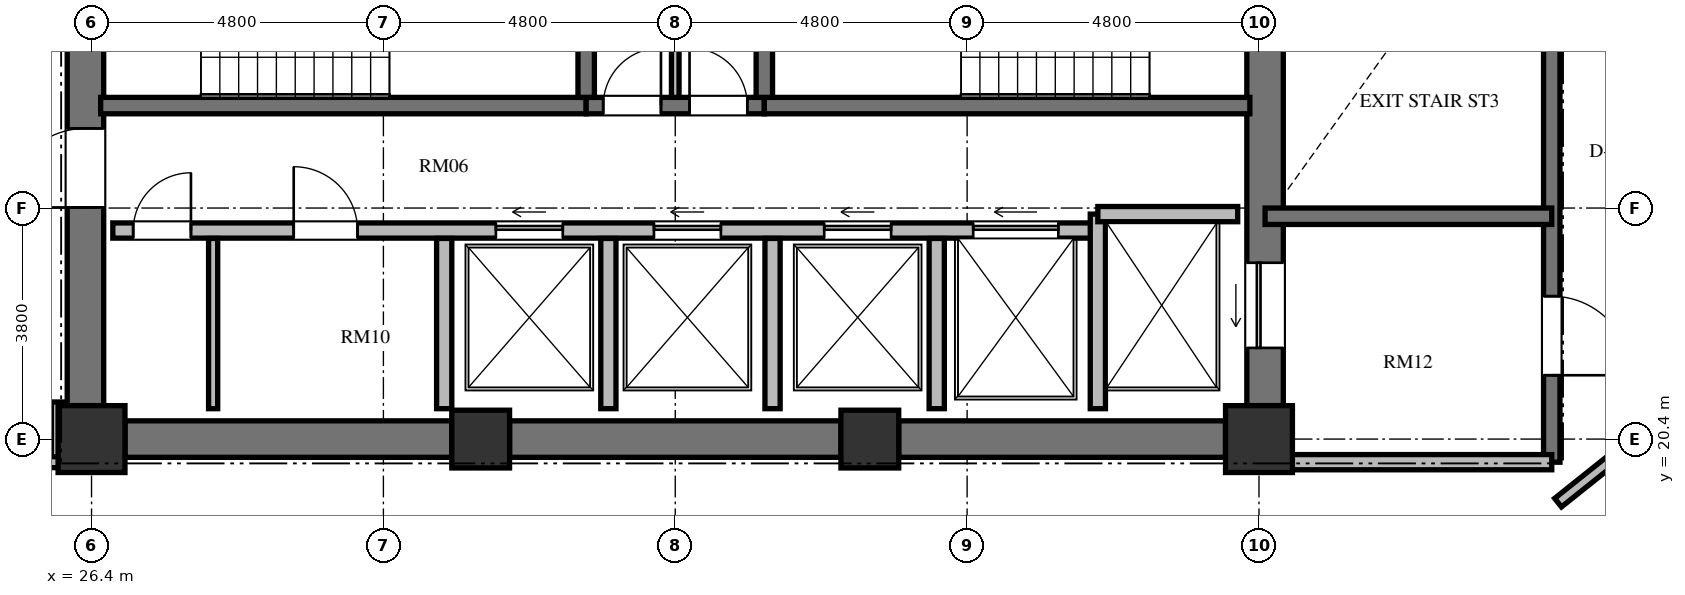
"""IFC4 building model, lengths in metres.
Left out: names, types, materials, properties, quantities, classifications, styles, units other than length and angle.
Written with IfcOpenShell. Run it as: python <this file> out.ifc"""

import sys

from ifc_helpers import new_model, si_unit, direction, frame, frame_2d, origin, origin_2d, place, context, subcontext, project, spatial, rectangle, extrude, element, fill, save


model = new_model("IFC4")
c1 = context("Model", 3, precision=1e-05, world=origin(), true_north=direction((0.0, 1.0)))
c2 = subcontext(c1, "Body", "Model", "MODEL_VIEW")
j1 = project(units=[si_unit("LENGTHUNIT", "METRE"), si_unit("PLANEANGLEUNIT", "RADIAN")], contexts=[c1])
p1 = place(None, origin())
s1 = spatial("IfcSite", under=j1, at=p1, CompositionType="ELEMENT")
p2 = place(p1, origin())
s2 = spatial("IfcBuilding", under=s1, at=p2, CompositionType="ELEMENT")
p3 = place(p2, frame((0.0, 0.0, 163.824)))
s3 = spatial("IfcBuildingStorey", under=s2, at=p3, CompositionType="ELEMENT", Elevation=163.824)
p4 = place(p3, frame((26.4, 20.4, 0.0), z_axis=(0.0, 0.0, 1.0), x_axis=(1.0, 0.0, 0.0)))
e1 = element("IfcColumn", 1, at=p4, inside=s3, PredefinedType="COLUMN", context=c2, shape_type="SweptSolid", body=[
    extrude(rectangle(XDim=1.1, YDim=1.1, at=origin_2d()), origin(), (0.0, 0.0, 1.0), 3.648),
])
for number, where, z_axis, x_axis in (
    (2, (32.8, 20.4, 0.0), (0.0, 0.0, 1.0), (1.0, 0.0, 0.0)),
    (3, (39.2, 20.4, 0.0), (0.0, 0.0, 1.0), (1.0, 0.0, 0.0)),
):
    element("IfcColumn", number, at=place(p3, frame(where, z_axis=z_axis, x_axis=x_axis)), inside=s3, PredefinedType="COLUMN", context=c2, shape_type="SweptSolid", body=[
        extrude(rectangle(XDim=0.95, YDim=0.95, at=origin_2d()), origin(), (0.0, 0.0, 1.0), 3.648),
    ])
p5 = place(p3, frame((45.6, 20.4, 0.0), z_axis=(0.0, 0.0, 1.0), x_axis=(1.0, 0.0, 0.0)))
e4 = element("IfcColumn", 4, at=p5, inside=s3, PredefinedType="COLUMN", context=c2, shape_type="SweptSolid", body=[
    extrude(rectangle(XDim=1.1, YDim=1.1, at=origin_2d()), origin(), (0.0, 0.0, 1.0), 3.648),
])
p6 = place(p3, frame((26.3, 20.95, 0.0), z_axis=(0.0, 0.0, 1.0), x_axis=(0.0, 1.0, 0.0)))
e5 = element("IfcWall", 5, at=p6, inside=s3, PredefinedType="SHEAR", context=c2, shape_type="SweptSolid", body=[
    extrude(rectangle(XDim=14.1, YDim=0.6, at=frame_2d((7.05, 0.0))), origin(), (0.0, 0.0, 1.0), 3.648),
])
p7 = place(p6, frame((6.5, 0.0, 0.0)))
e6 = element("IfcOpeningElement", 6, at=p7, cuts=e5, PredefinedType="OPENING", context=c2, shape_type="SweptSolid", body=[
    extrude(rectangle(XDim=1.2, YDim=2.15, at=frame_2d((0.6, 1.075))), frame((0.0, 0.31, 0.0), z_axis=(0.0, -1.0, 0.0), x_axis=(1.0, 0.0, 0.0)), (0.0, 0.0, 1.0), 0.62),
])
p8 = place(p6, frame((9.6, 0.0, 0.0)))
e7 = element("IfcOpeningElement", 7, at=p8, cuts=e5, PredefinedType="OPENING", context=c2, shape_type="SweptSolid", body=[
    extrude(rectangle(XDim=1.3, YDim=2.2, at=frame_2d((0.65, 1.1))), frame((0.0, 0.31, 0.0), z_axis=(0.0, -1.0, 0.0), x_axis=(1.0, 0.0, 0.0)), (0.0, 0.0, 1.0), 0.62),
])
p9 = place(p6, frame((3.26, 0.0, 0.0)))
e8 = element("IfcOpeningElement", 8, at=p9, cuts=e5, PredefinedType="OPENING", context=c2, shape_type="SweptSolid", body=[
    extrude(rectangle(XDim=1.3, YDim=2.2, at=frame_2d((0.65, 1.1))), frame((0.0, 0.31, 0.0), z_axis=(0.0, -1.0, 0.0), x_axis=(1.0, 0.0, 0.0)), (0.0, 0.0, 1.0), 0.62),
])
p10 = place(p3, frame((45.7, 20.95, 0.0), z_axis=(0.0, 0.0, 1.0), x_axis=(0.0, 1.0, 0.0)))
e9 = element("IfcWall", 9, at=p10, inside=s3, PredefinedType="SHEAR", context=c2, shape_type="SweptSolid", body=[
    extrude(rectangle(XDim=14.1, YDim=0.6, at=frame_2d((7.05, 0.0))), origin(), (0.0, 0.0, 1.0), 3.648),
])
p11 = place(p10, frame((11.75, 0.0, 0.0)))
e10 = element("IfcOpeningElement", 10, at=p11, cuts=e9, PredefinedType="OPENING", context=c2, shape_type="SweptSolid", body=[
    extrude(rectangle(XDim=1.4, YDim=2.3, at=frame_2d((0.7, 1.15))), frame((0.0, 0.31, 0.0), z_axis=(0.0, -1.0, 0.0), x_axis=(1.0, 0.0, 0.0)), (0.0, 0.0, 1.0), 0.62),
])
p12 = place(p10, frame((0.95, 0.0, 0.0)))
e11 = element("IfcOpeningElement", 11, at=p12, cuts=e9, PredefinedType="OPENING", context=c2, shape_type="SweptSolid", body=[
    extrude(rectangle(XDim=1.4, YDim=2.3, at=frame_2d((0.7, 1.15))), frame((0.0, 0.31, 0.0), z_axis=(0.0, -1.0, 0.0), x_axis=(1.0, 0.0, 0.0)), (0.0, 0.0, 1.0), 0.62),
])
p13 = place(p3, frame((26.95, 20.4, 0.0), z_axis=(0.0, 0.0, 1.0), x_axis=(1.0, 0.0, 0.0)))
e12 = element("IfcWall", 12, at=p13, inside=s3, PredefinedType="SHEAR", context=c2, shape_type="SweptSolid", body=[
    extrude(rectangle(XDim=5.375, YDim=0.6, at=frame_2d((2.688, 0.0))), origin(), (0.0, 0.0, 1.0), 3.648),
])
p14 = place(p3, frame((33.275, 20.4, 0.0), z_axis=(0.0, 0.0, 1.0), x_axis=(1.0, 0.0, 0.0)))
e13 = element("IfcWall", 13, at=p14, inside=s3, PredefinedType="SHEAR", context=c2, shape_type="SweptSolid", body=[
    extrude(rectangle(XDim=5.45, YDim=0.6, at=frame_2d((2.725, 0.0))), origin(), (0.0, 0.0, 1.0), 3.648),
])
p15 = place(p3, frame((39.675, 20.4, 0.0), z_axis=(0.0, 0.0, 1.0), x_axis=(1.0, 0.0, 0.0)))
e14 = element("IfcWall", 14, at=p15, inside=s3, PredefinedType="SHEAR", context=c2, shape_type="SweptSolid", body=[
    extrude(rectangle(XDim=5.375, YDim=0.6, at=frame_2d((2.688, 0.0))), origin(), (0.0, 0.0, 1.0), 3.648),
])
p16 = place(p3, frame((26.55, 25.885, 0.0), z_axis=(0.0, 0.0, 1.0), x_axis=(1.0, 0.0, 0.0)))
e15 = element("IfcWall", 15, at=p16, inside=s3, PredefinedType="SHEAR", context=c2, shape_type="SweptSolid", body=[
    extrude(rectangle(XDim=7.985, YDim=0.27, at=frame_2d((3.992, 0.0))), origin(), (0.0, 0.0, 1.0), 3.648),
])
p17 = place(p3, frame((34.535, 25.885, 0.0), z_axis=(0.0, 0.0, 1.0), x_axis=(1.0, 0.0, 0.0)))
e16 = element("IfcWall", 16, at=p17, inside=s3, PredefinedType="SHEAR", context=c2, shape_type="SweptSolid", body=[
    extrude(rectangle(XDim=2.93, YDim=0.27, at=frame_2d((1.465, 0.0))), origin(), (0.0, 0.0, 1.0), 3.648),
])
p18 = place(p17, frame((0.28, 0.0, 0.0)))
e17 = element("IfcOpeningElement", 17, at=p18, cuts=e16, PredefinedType="OPENING", context=c2, shape_type="SweptSolid", body=[
    extrude(rectangle(XDim=0.95, YDim=2.1, at=frame_2d((0.475, 1.05))), frame((0.0, 0.145, 0.0), z_axis=(0.0, -1.0, 0.0), x_axis=(1.0, 0.0, 0.0)), (0.0, 0.0, 1.0), 0.29),
])
p19 = place(p17, frame((1.7, 0.0, 0.0)))
e18 = element("IfcOpeningElement", 18, at=p19, cuts=e16, PredefinedType="OPENING", context=c2, shape_type="SweptSolid", body=[
    extrude(rectangle(XDim=0.95, YDim=2.1, at=frame_2d((0.475, 1.05))), frame((0.0, 0.145, 0.0), z_axis=(0.0, -1.0, 0.0), x_axis=(1.0, 0.0, 0.0)), (0.0, 0.0, 1.0), 0.29),
])
p20 = place(p3, frame((37.465, 25.885, 0.0), z_axis=(0.0, 0.0, 1.0), x_axis=(1.0, 0.0, 0.0)))
e19 = element("IfcWall", 19, at=p20, inside=s3, PredefinedType="SHEAR", context=c2, shape_type="SweptSolid", body=[
    extrude(rectangle(XDim=7.985, YDim=0.27, at=frame_2d((3.992, 0.0))), origin(), (0.0, 0.0, 1.0), 3.648),
])
for number, where, z_axis, x_axis in (
    (20, (34.535, 26.02, 0.0), (0.0, 0.0, 1.0), (0.0, 1.0, 0.0)),
    (21, (37.465, 26.02, 0.0), (0.0, 0.0, 1.0), (0.0, 1.0, 0.0)),
):
    element("IfcWall", number, at=place(p3, frame(where, z_axis=z_axis, x_axis=x_axis)), inside=s3, PredefinedType="SHEAR", context=c2, shape_type="SweptSolid", body=[
        extrude(rectangle(XDim=4.08, YDim=0.27, at=frame_2d((2.04, 0.0))), origin(), (0.0, 0.0, 1.0), 3.648),
    ])
p21 = place(p3, frame((36.0, 26.02, 0.0), z_axis=(0.0, 0.0, 1.0), x_axis=(0.0, 1.0, 0.0)))
e22 = element("IfcWall", 22, at=p21, inside=s3, PredefinedType="PARTITIONING", context=c2, shape_type="SweptSolid", body=[
    extrude(rectangle(XDim=4.08, YDim=0.125, at=frame_2d((2.04, 0.0))), origin(), (0.0, 0.0, 1.0), 3.428),
])
p22 = place(p3, frame((26.75, 23.83, 0.0), z_axis=(0.0, 0.0, 1.0), x_axis=(1.0, 0.0, 0.0)))
e23 = element("IfcWall", 23, at=p22, inside=s3, PredefinedType="SOLIDWALL", context=c2, shape_type="SweptSolid", body=[
    extrude(rectangle(XDim=16.2, YDim=0.25, at=frame_2d((8.1, 0.0))), origin(), (0.0, 0.0, 1.0), 3.428),
])
p23 = place(p22, frame((0.335, 0.0, 0.0)))
e24 = element("IfcOpeningElement", 24, at=p23, cuts=e23, PredefinedType="OPENING", context=c2, shape_type="SweptSolid", body=[
    extrude(rectangle(XDim=0.95, YDim=2.1, at=frame_2d((0.475, 1.05))), frame((0.0, 0.135, 0.0), z_axis=(0.0, -1.0, 0.0), x_axis=(1.0, 0.0, 0.0)), (0.0, 0.0, 1.0), 0.27),
])
p24 = place(p22, frame((2.975, 0.0, 0.0)))
e25 = element("IfcOpeningElement", 25, at=p24, cuts=e23, PredefinedType="OPENING", context=c2, shape_type="SweptSolid", body=[
    extrude(rectangle(XDim=1.05, YDim=2.15, at=frame_2d((0.525, 1.075))), frame((0.0, 0.135, 0.0), z_axis=(0.0, -1.0, 0.0), x_axis=(1.0, 0.0, 0.0)), (0.0, 0.0, 1.0), 0.27),
])
p25 = place(p22, frame((6.3, 0.0, 0.0)))
e26 = element("IfcOpeningElement", 26, at=p25, cuts=e23, PredefinedType="OPENING", context=c2, shape_type="SweptSolid", body=[
    extrude(rectangle(XDim=1.1, YDim=2.2, at=frame_2d((0.55, 1.1))), frame((0.0, 0.135, 0.0), z_axis=(0.0, -1.0, 0.0), x_axis=(1.0, 0.0, 0.0)), (0.0, 0.0, 1.0), 0.27),
])
p26 = place(p22, frame((8.9, 0.0, 0.0)))
e27 = element("IfcOpeningElement", 27, at=p26, cuts=e23, PredefinedType="OPENING", context=c2, shape_type="SweptSolid", body=[
    extrude(rectangle(XDim=1.1, YDim=2.2, at=frame_2d((0.55, 1.1))), frame((0.0, 0.135, 0.0), z_axis=(0.0, -1.0, 0.0), x_axis=(1.0, 0.0, 0.0)), (0.0, 0.0, 1.0), 0.27),
])
p27 = place(p22, frame((11.7, 0.0, 0.0)))
e28 = element("IfcOpeningElement", 28, at=p27, cuts=e23, PredefinedType="OPENING", context=c2, shape_type="SweptSolid", body=[
    extrude(rectangle(XDim=1.1, YDim=2.2, at=frame_2d((0.55, 1.1))), frame((0.0, 0.135, 0.0), z_axis=(0.0, -1.0, 0.0), x_axis=(1.0, 0.0, 0.0)), (0.0, 0.0, 1.0), 0.27),
])
p28 = place(p22, frame((14.15, 0.0, 0.0)))
e29 = element("IfcOpeningElement", 29, at=p28, cuts=e23, PredefinedType="OPENING", context=c2, shape_type="SweptSolid", body=[
    extrude(rectangle(XDim=1.4, YDim=2.3, at=frame_2d((0.7, 1.15))), frame((0.0, 0.135, 0.0), z_axis=(0.0, -1.0, 0.0), x_axis=(1.0, 0.0, 0.0)), (0.0, 0.0, 1.0), 0.27),
])
p29 = place(p3, frame((42.95, 20.9, 0.0), z_axis=(0.0, 0.0, 1.0), x_axis=(0.0, 1.0, 0.0)))
e30 = element("IfcWall", 30, at=p29, inside=s3, PredefinedType="SOLIDWALL", context=c2, shape_type="SweptSolid", body=[
    extrude(rectangle(XDim=3.2, YDim=0.25, at=frame_2d((1.6, 0.0))), origin(), (0.0, 0.0, 1.0), 3.428),
])
p30 = place(p3, frame((42.95, 24.1, 0.0), z_axis=(0.0, 0.0, 1.0), x_axis=(1.0, 0.0, 0.0)))
e31 = element("IfcWall", 31, at=p30, inside=s3, PredefinedType="SOLIDWALL", context=c2, shape_type="SweptSolid", body=[
    extrude(rectangle(XDim=2.3, YDim=0.25, at=frame_2d((1.15, 0.0))), origin(), (0.0, 0.0, 1.0), 3.428),
])
for number, where, z_axis, x_axis in (
    (32, (32.2, 20.9, 0.0), (0.0, 0.0, 1.0), (0.0, 1.0, 0.0)),
    (33, (34.9, 20.9, 0.0), (0.0, 0.0, 1.0), (0.0, 1.0, 0.0)),
    (34, (37.6, 20.9, 0.0), (0.0, 0.0, 1.0), (0.0, 1.0, 0.0)),
    (35, (40.3, 20.9, 0.0), (0.0, 0.0, 1.0), (0.0, 1.0, 0.0)),
):
    element("IfcWall", number, at=place(p3, frame(where, z_axis=z_axis, x_axis=x_axis)), inside=s3, PredefinedType="SOLIDWALL", context=c2, shape_type="SweptSolid", body=[
        extrude(rectangle(XDim=2.8, YDim=0.25, at=frame_2d((1.4, 0.0))), origin(), (0.0, 0.0, 1.0), 3.428),
    ])
p31 = place(p3, frame((28.4, 20.9, 0.0), z_axis=(0.0, 0.0, 1.0), x_axis=(0.0, 1.0, 0.0)))
e36 = element("IfcWall", 36, at=p31, inside=s3, PredefinedType="PARTITIONING", context=c2, shape_type="SweptSolid", body=[
    extrude(rectangle(XDim=2.8, YDim=0.15, at=frame_2d((1.4, 0.0))), origin(), (0.0, 0.0, 1.0), 3.428),
])
p32 = place(p3, frame((50.415, 35.845, 0.0), z_axis=(0.0, 0.0, 1.0), x_axis=(0.0, -1.0, 0.0)))
e37 = element("IfcWall", 37, at=p32, inside=s3, PredefinedType="SHEAR", context=c2, shape_type="SweptSolid", body=[
    extrude(rectangle(XDim=15.825, YDim=0.27, at=frame_2d((7.913, 0.0))), origin(), (0.0, 0.0, 1.0), 3.648),
])
p33 = place(p32, frame((4.445, 0.0, 0.0)))
e38 = element("IfcOpeningElement", 38, at=p33, cuts=e37, PredefinedType="OPENING", context=c2, shape_type="SweptSolid", body=[
    extrude(rectangle(XDim=1.2, YDim=2.15, at=frame_2d((0.6, 1.075))), frame((0.0, 0.145, 0.0), z_axis=(0.0, -1.0, 0.0), x_axis=(1.0, 0.0, 0.0)), (0.0, 0.0, 1.0), 0.29),
])
p34 = place(p32, frame((1.295, 0.0, 0.0)))
e39 = element("IfcOpeningElement", 39, at=p34, cuts=e37, PredefinedType="OPENING", context=c2, shape_type="SweptSolid", body=[
    extrude(rectangle(XDim=1.3, YDim=2.2, at=frame_2d((0.65, 1.1))), frame((0.0, 0.145, 0.0), z_axis=(0.0, -1.0, 0.0), x_axis=(1.0, 0.0, 0.0)), (0.0, 0.0, 1.0), 0.29),
])
p35 = place(p32, frame((13.095, 0.0, 0.0)))
e40 = element("IfcOpeningElement", 40, at=p35, cuts=e37, PredefinedType="OPENING", context=c2, shape_type="SweptSolid", body=[
    extrude(rectangle(XDim=1.3, YDim=2.2, at=frame_2d((0.65, 1.1))), frame((0.0, 0.145, 0.0), z_axis=(0.0, -1.0, 0.0), x_axis=(1.0, 0.0, 0.0)), (0.0, 0.0, 1.0), 0.29),
])
p36 = place(p3, frame((45.7, 24.065, 0.0), z_axis=(0.0, 0.0, 1.0), x_axis=(1.0, 0.0, 0.0)))
e41 = element("IfcWall", 41, at=p36, inside=s3, PredefinedType="SHEAR", context=c2, shape_type="SweptSolid", body=[
    extrude(rectangle(XDim=4.715, YDim=0.27, at=frame_2d((2.357, 0.0))), origin(), (0.0, 0.0, 1.0), 3.648),
])
p37 = place(p3, frame((45.7, 20.02, 0.0), z_axis=(0.0, 0.0, 1.0), x_axis=(1.0, 0.0, 0.0)))
e42 = element("IfcWall", 42, at=p37, inside=s3, PredefinedType="SOLIDWALL", context=c2, shape_type="SweptSolid", body=[
    extrude(rectangle(XDim=4.715, YDim=0.25, at=frame_2d((2.357, 0.0))), origin(), (0.0, 0.0, 1.0), 3.428),
])
p38 = place(p3, frame((53.181, 21.481, 0.0), z_axis=(0.0, 0.0, 1.0), x_axis=(-0.781420737726, -0.624004511724, 0.0)))
e43 = element("IfcWall", 43, at=p38, inside=s3, PredefinedType="PARTITIONING", context=c2, shape_type="SweptSolid", body=[
    extrude(rectangle(XDim=3.407, YDim=0.18, at=frame_2d((1.704, 0.0))), origin(), (0.0, 0.0, 1.0), 3.428),
])
p39 = place(p3, frame((25.83, 21.01, 0.0), z_axis=(0.0, 0.0, 1.0), x_axis=(0.0, -1.0, 0.0)))
e44 = element("IfcWall", 44, at=p39, inside=s3, PredefinedType="PARTITIONING", context=c2, shape_type="SweptSolid", body=[
    extrude(rectangle(XDim=1.03, YDim=0.18, at=frame_2d((0.515, 0.0))), origin(), (0.0, 0.0, 1.0), 3.428),
])
p40 = place(p3, frame((25.87, 20.02, 0.0), z_axis=(0.0, 0.0, 1.0), x_axis=(-1.0, 0.0, 0.0)))
e45 = element("IfcWall", 45, at=p40, inside=s3, PredefinedType="PARTITIONING", context=c2, shape_type="SweptSolid", body=[
    extrude(rectangle(XDim=2.56, YDim=0.18, at=frame_2d((1.28, 0.0))), origin(), (0.0, 0.0, 1.0), 3.428),
])
p41 = place(p18, origin())
e46 = element("IfcDoor", 46, at=p41, inside=s3, OperationType="SINGLE_SWING_RIGHT", PredefinedType="DOOR", context=c2, shape_type="SweptSolid", body=[
    extrude(rectangle(XDim=0.95, YDim=2.1, at=frame_2d((0.475, 1.05))), frame((0.0, 0.025, 0.0), z_axis=(0.0, -1.0, 0.0), x_axis=(1.0, 0.0, 0.0)), (0.0, 0.0, 1.0), 0.05),
])
fill(e17, e46)
p42 = place(p19, origin())
e47 = element("IfcDoor", 47, at=p42, inside=s3, OperationType="SINGLE_SWING_LEFT", PredefinedType="DOOR", context=c2, shape_type="SweptSolid", body=[
    extrude(rectangle(XDim=0.95, YDim=2.1, at=frame_2d((0.475, 1.05))), frame((0.0, 0.025, 0.0), z_axis=(0.0, -1.0, 0.0), x_axis=(1.0, 0.0, 0.0)), (0.0, 0.0, 1.0), 0.05),
])
fill(e18, e47)
p43 = place(p9, origin())
e48 = element("IfcDoor", 48, at=p43, inside=s3, OperationType="SINGLE_SWING_LEFT", PredefinedType="DOOR", context=c2, shape_type="SweptSolid", body=[
    extrude(rectangle(XDim=1.3, YDim=2.2, at=frame_2d((0.65, 1.1))), frame((0.0, 0.025, 0.0), z_axis=(0.0, -1.0, 0.0), x_axis=(1.0, 0.0, 0.0)), (0.0, 0.0, 1.0), 0.05),
])
fill(e8, e48)
p44 = place(p23, origin())
e49 = element("IfcDoor", 49, at=p44, inside=s3, OperationType="SINGLE_SWING_RIGHT", PredefinedType="DOOR", context=c2, shape_type="SweptSolid", body=[
    extrude(rectangle(XDim=0.95, YDim=2.1, at=frame_2d((0.475, 1.05))), frame((0.0, 0.025, 0.0), z_axis=(0.0, -1.0, 0.0), x_axis=(1.0, 0.0, 0.0)), (0.0, 0.0, 1.0), 0.05),
])
fill(e24, e49)
p45 = place(p24, origin())
e50 = element("IfcDoor", 50, at=p45, inside=s3, OperationType="SINGLE_SWING_LEFT", PredefinedType="DOOR", context=c2, shape_type="SweptSolid", body=[
    extrude(rectangle(XDim=1.05, YDim=2.15, at=frame_2d((0.525, 1.075))), frame((0.0, 0.025, 0.0), z_axis=(0.0, -1.0, 0.0), x_axis=(1.0, 0.0, 0.0)), (0.0, 0.0, 1.0), 0.05),
])
fill(e25, e50)
p46 = place(p25, origin())
e51 = element("IfcDoor", 51, at=p46, inside=s3, OperationType="SLIDING_TO_LEFT", PredefinedType="DOOR", context=c2, shape_type="SweptSolid", body=[
    extrude(rectangle(XDim=1.1, YDim=2.2, at=frame_2d((0.55, 1.1))), frame((0.0, 0.025, 0.0), z_axis=(0.0, -1.0, 0.0), x_axis=(1.0, 0.0, 0.0)), (0.0, 0.0, 1.0), 0.05),
])
fill(e26, e51)
p47 = place(p26, origin())
e52 = element("IfcDoor", 52, at=p47, inside=s3, OperationType="SLIDING_TO_LEFT", PredefinedType="DOOR", context=c2, shape_type="SweptSolid", body=[
    extrude(rectangle(XDim=1.1, YDim=2.2, at=frame_2d((0.55, 1.1))), frame((0.0, 0.025, 0.0), z_axis=(0.0, -1.0, 0.0), x_axis=(1.0, 0.0, 0.0)), (0.0, 0.0, 1.0), 0.05),
])
fill(e27, e52)
p48 = place(p27, origin())
e53 = element("IfcDoor", 53, at=p48, inside=s3, OperationType="SLIDING_TO_LEFT", PredefinedType="DOOR", context=c2, shape_type="SweptSolid", body=[
    extrude(rectangle(XDim=1.1, YDim=2.2, at=frame_2d((0.55, 1.1))), frame((0.0, 0.025, 0.0), z_axis=(0.0, -1.0, 0.0), x_axis=(1.0, 0.0, 0.0)), (0.0, 0.0, 1.0), 0.05),
])
fill(e28, e53)
p49 = place(p12, origin())
e54 = element("IfcDoor", 54, at=p49, inside=s3, OperationType="SLIDING_TO_LEFT", PredefinedType="DOOR", context=c2, shape_type="SweptSolid", body=[
    extrude(rectangle(XDim=1.4, YDim=2.3, at=frame_2d((0.7, 1.15))), frame((0.0, 0.025, 0.0), z_axis=(0.0, -1.0, 0.0), x_axis=(1.0, 0.0, 0.0)), (0.0, 0.0, 1.0), 0.05),
])
fill(e11, e54)
p50 = place(p28, origin())
e55 = element("IfcDoor", 55, at=p50, inside=s3, OperationType="SLIDING_TO_LEFT", PredefinedType="DOOR", context=c2, shape_type="SweptSolid", body=[
    extrude(rectangle(XDim=1.4, YDim=2.3, at=frame_2d((0.7, 1.15))), frame((0.0, 0.025, 0.0), z_axis=(0.0, -1.0, 0.0), x_axis=(1.0, 0.0, 0.0)), (0.0, 0.0, 1.0), 0.05),
])
fill(e29, e55)
p51 = place(p35, origin())
e56 = element("IfcDoor", 56, at=p51, inside=s3, OperationType="SINGLE_SWING_RIGHT", PredefinedType="DOOR", context=c2, shape_type="SweptSolid", body=[
    extrude(rectangle(XDim=1.3, YDim=2.2, at=frame_2d((0.65, 1.1))), frame((0.0, 0.025, 0.0), z_axis=(0.0, -1.0, 0.0), x_axis=(1.0, 0.0, 0.0)), (0.0, 0.0, 1.0), 0.05),
])
fill(e40, e56)
save(model, sys.argv[1])
